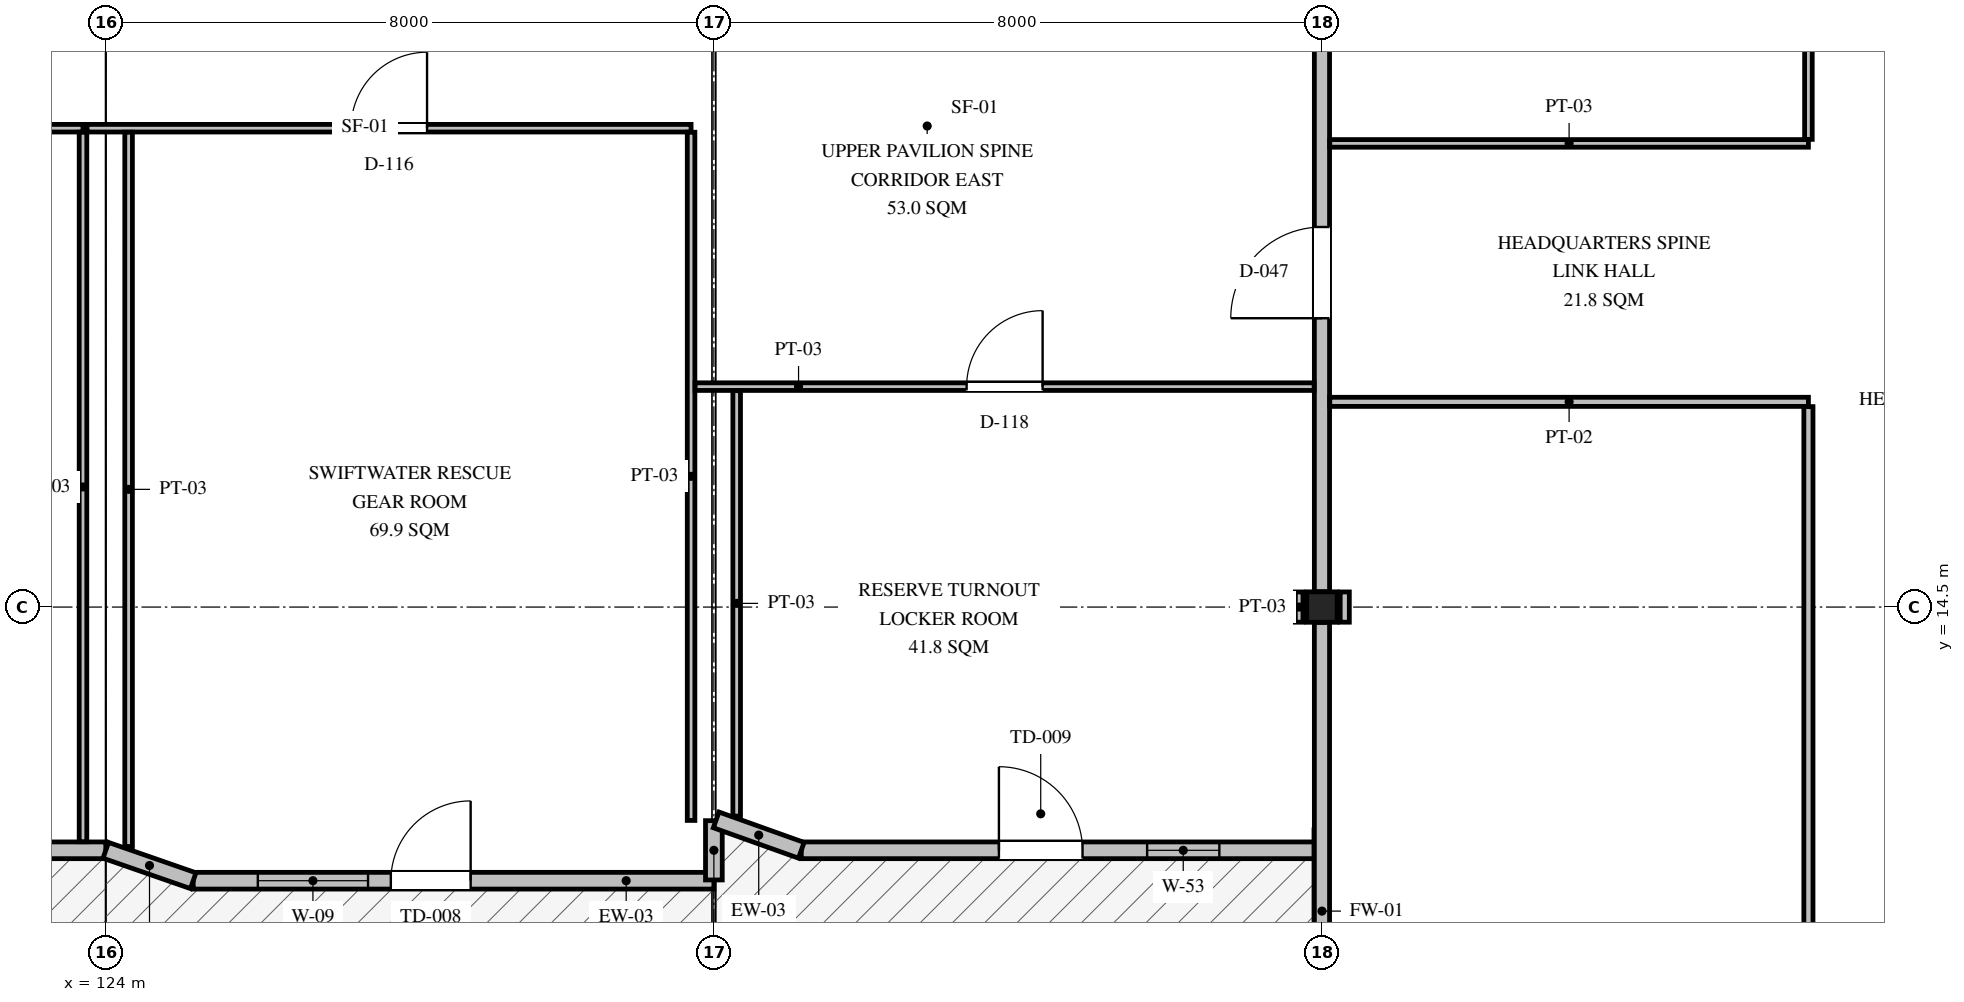
"""IFC4 building model, lengths in metres.
Left out: names, types, materials, properties, quantities, classifications, styles, units other than length and angle.
Written with IfcOpenShell. Run it as: python <this file> out.ifc"""

import sys

from ifc_helpers import new_model, si_unit, direction, frame, frame_2d, origin, origin_2d, place, context, subcontext, project, spatial, polyline, rectangle, i_section, outline, extrude, element, fill, save


model = new_model("IFC4")
c1 = context("Model", 3, precision=1e-05, world=origin(), true_north=direction((0.0, 1.0)))
c2 = subcontext(c1, "Body", "Model", "MODEL_VIEW")
j1 = project(units=[si_unit("LENGTHUNIT", "METRE"), si_unit("PLANEANGLEUNIT", "RADIAN")], contexts=[c1])
p1 = place(None, origin())
s1 = spatial("IfcSite", under=j1, at=p1, CompositionType="ELEMENT")
p2 = place(p1, origin())
s2 = spatial("IfcBuilding", under=s1, at=p2, CompositionType="ELEMENT")
p3 = place(p2, frame((0.0, 0.0, 5.85)))
s3 = spatial("IfcBuildingStorey", under=s2, at=p3, CompositionType="ELEMENT", Elevation=5.85)
p4 = place(p3, frame((140.0, 14.5, 0.0), z_axis=(0.0, 0.0, 1.0), x_axis=(1.0, 0.0, 0.0)))
e1 = element("IfcColumn", 1, at=p4, inside=s3, PredefinedType="COLUMN", context=c2, shape_type="SweptSolid", body=[
    extrude(i_section(OverallWidth=0.4, OverallDepth=0.4, WebThickness=0.013, FlangeThickness=0.021, FilletRadius=0.022, at=origin_2d()), origin(), (0.0, 0.0, 1.0), 4.2),
])
p5 = place(p3, frame((116.65, 11.3, 0.0), z_axis=(0.0, 0.0, 1.0), x_axis=(1.0, 0.0, 0.0)))
e2 = element("IfcWall", 2, at=p5, inside=s3, PredefinedType="SOLIDWALL", context=c2, shape_type="SweptSolid", body=[
    extrude(rectangle(XDim=7.35, YDim=0.22, at=frame_2d((3.675, 0.0))), origin(), (0.0, 0.0, 1.0), 4.0),
])
p6 = place(p5, frame((2.6, 0.0, 0.0)))
e3 = element("IfcOpeningElement", 3, at=p6, cuts=e2, PredefinedType="OPENING", context=c2, shape_type="SweptSolid", body=[
    extrude(rectangle(XDim=1.1, YDim=2.2, at=frame_2d((0.55, 1.1))), frame((0.0, 0.12, 0.0), z_axis=(0.0, -1.0, 0.0), x_axis=(1.0, 0.0, 0.0)), (0.0, 0.0, 1.0), 0.24),
])
p7 = place(p5, frame((0.8, 0.0, 1.1)))
e4 = element("IfcOpeningElement", 4, at=p7, cuts=e2, PredefinedType="OPENING", context=c2, shape_type="SweptSolid", body=[
    extrude(rectangle(XDim=1.35, YDim=1.35, at=frame_2d((0.675, 0.675))), frame((0.0, 0.12, 0.0), z_axis=(0.0, -1.0, 0.0), x_axis=(1.0, 0.0, 0.0)), (0.0, 0.0, 1.0), 0.24),
])
p8 = place(p5, frame((4.55, 0.0, 1.35)))
e5 = element("IfcOpeningElement", 5, at=p8, cuts=e2, PredefinedType="OPENING", context=c2, shape_type="SweptSolid", body=[
    extrude(rectangle(XDim=1.7, YDim=1.65, at=frame_2d((0.85, 0.825))), frame((0.0, 0.12, 0.0), z_axis=(0.0, -1.0, 0.0), x_axis=(1.0, 0.0, 0.0)), (0.0, 0.0, 1.0), 0.24),
])
p9 = place(p3, frame((125.15, 10.9, 0.0), z_axis=(0.0, 0.0, 1.0), x_axis=(1.0, 0.0, 0.0)))
e6 = element("IfcWall", 6, at=p9, inside=s3, PredefinedType="SOLIDWALL", context=c2, shape_type="SweptSolid", body=[
    extrude(outline(polyline([(0.0, 0.0), (6.85, 0.0), (6.85, 3.95), (2.21, 10.82), (0.0, 3.95), (0.0, 0.0)])), frame((0.0, 0.11, 0.0), z_axis=(0.0, -1.0, 0.0), x_axis=(1.0, 0.0, 0.0)), (0.0, 0.0, 1.0), 0.22),
])
p10 = place(p9, frame((2.6, 0.0, 0.0)))
e7 = element("IfcOpeningElement", 7, at=p10, cuts=e6, PredefinedType="OPENING", context=c2, shape_type="SweptSolid", body=[
    extrude(rectangle(XDim=1.05, YDim=2.15, at=frame_2d((0.525, 1.075))), frame((0.0, 0.12, 0.0), z_axis=(0.0, -1.0, 0.0), x_axis=(1.0, 0.0, 0.0)), (0.0, 0.0, 1.0), 0.24),
])
p11 = place(p9, frame((0.85, 0.0, 1.1)))
e8 = element("IfcOpeningElement", 8, at=p11, cuts=e6, PredefinedType="OPENING", context=c2, shape_type="SweptSolid", body=[
    extrude(rectangle(XDim=1.45, YDim=1.45, at=frame_2d((0.725, 0.725))), frame((0.0, 0.12, 0.0), z_axis=(0.0, -1.0, 0.0), x_axis=(1.0, 0.0, 0.0)), (0.0, 0.0, 1.0), 0.24),
])
p12 = place(p3, frame((124.0, 11.3, 0.0), z_axis=(0.0, 0.0, 1.0), x_axis=(0.944450799651, -0.328652836651, 0.0)))
e9 = element("IfcWall", 9, at=p12, inside=s3, PredefinedType="SOLIDWALL", context=c2, shape_type="SweptSolid", body=[
    extrude(outline(polyline([(0.0, 0.0), (1.218, 0.0), (1.218, 3.95), (0.0, 3.95), (0.0, 0.0)])), frame((0.0, 0.11, 0.0), z_axis=(0.0, -1.0, 0.0), x_axis=(1.0, 0.0, 0.0)), (0.0, 0.0, 1.0), 0.22),
])
p13 = place(p3, frame((132.0, 10.91, 0.0), z_axis=(0.0, 0.0, 1.0), x_axis=(0.0, 1.0, 0.0)))
e10 = element("IfcWall", 10, at=p13, inside=s3, PredefinedType="SOLIDWALL", context=c2, shape_type="SweptSolid", body=[
    extrude(rectangle(XDim=0.78, YDim=0.22, at=frame_2d((0.39, 0.0))), origin(), (0.0, 0.0, 1.0), 3.59),
])
p14 = place(p3, frame((133.15, 11.3, 0.0), z_axis=(0.0, 0.0, 1.0), x_axis=(1.0, 0.0, 0.0)))
e11 = element("IfcWall", 11, at=p14, inside=s3, PredefinedType="SOLIDWALL", context=c2, shape_type="SweptSolid", body=[
    extrude(rectangle(XDim=6.75, YDim=0.22, at=frame_2d((3.375, 0.0))), origin(), (0.0, 0.0, 1.0), 3.96),
])
p15 = place(p14, frame((2.6, 0.0, 0.0)))
e12 = element("IfcOpeningElement", 12, at=p15, cuts=e11, PredefinedType="OPENING", context=c2, shape_type="SweptSolid", body=[
    extrude(rectangle(XDim=1.1, YDim=2.2, at=frame_2d((0.55, 1.1))), frame((0.0, 0.12, 0.0), z_axis=(0.0, -1.0, 0.0), x_axis=(1.0, 0.0, 0.0)), (0.0, 0.0, 1.0), 0.24),
])
p16 = place(p14, frame((4.55, 0.0, 1.35)))
e13 = element("IfcOpeningElement", 13, at=p16, cuts=e11, PredefinedType="OPENING", context=c2, shape_type="SweptSolid", body=[
    extrude(rectangle(XDim=0.95, YDim=1.65, at=frame_2d((0.475, 0.825))), frame((0.0, 0.12, 0.0), z_axis=(0.0, -1.0, 0.0), x_axis=(1.0, 0.0, 0.0)), (0.0, 0.0, 1.0), 0.24),
])
p17 = place(p3, frame((132.03, 11.7, 0.0), z_axis=(0.0, 0.0, 1.0), x_axis=(0.941755845838, -0.336297378566, 0.0)))
e14 = element("IfcWall", 14, at=p17, inside=s3, PredefinedType="SOLIDWALL", context=c2, shape_type="SweptSolid", body=[
    extrude(outline(polyline([(0.0, 0.0), (1.189, 0.0), (1.189, 3.95), (0.0, 3.95), (0.0, 0.0)])), frame((0.0, 0.11, 0.0), z_axis=(0.0, -1.0, 0.0), x_axis=(1.0, 0.0, 0.0)), (0.0, 0.0, 1.0), 0.22),
])
p18 = place(p3, frame((140.0, 6.702, 0.0), z_axis=(0.0, 0.0, 1.0), x_axis=(0.0, 1.0, 0.0)))
e15 = element("IfcWall", 15, at=p18, inside=s3, PredefinedType="PARTITIONING", context=c2, shape_type="SweptSolid", body=[
    extrude(rectangle(XDim=7.596, YDim=0.2, at=frame_2d((3.798, 0.0))), origin(), (0.0, 0.0, 1.0), 3.366),
])
p19 = place(p3, frame((140.0, 14.702, 0.0), z_axis=(0.0, 0.0, 1.0), x_axis=(0.0, 1.0, 0.0)))
e16 = element("IfcWall", 16, at=p19, inside=s3, PredefinedType="PARTITIONING", context=c2, shape_type="SweptSolid", body=[
    extrude(rectangle(XDim=7.596, YDim=0.2, at=frame_2d((3.798, 0.0))), origin(), (0.0, 0.0, 1.0), 3.304),
])
p20 = place(p19, frame((3.598, 0.0, 0.0)))
e17 = element("IfcOpeningElement", 17, at=p20, cuts=e16, PredefinedType="OPENING", context=c2, shape_type="SweptSolid", body=[
    extrude(rectangle(XDim=1.2, YDim=2.15, at=frame_2d((0.6, 1.075))), frame((0.0, 0.11, 0.0), z_axis=(0.0, -1.0, 0.0), x_axis=(1.0, 0.0, 0.0)), (0.0, 0.0, 1.0), 0.22),
])
p21 = place(p3, frame((115.253, 20.8, 0.0), z_axis=(0.0, 0.0, 1.0), x_axis=(1.0, 0.0, 0.0)))
e18 = element("IfcWall", 18, at=p21, inside=s3, PredefinedType="PARTITIONING", context=c2, shape_type="SweptSolid", body=[
    extrude(rectangle(XDim=8.447, YDim=0.1, at=frame_2d((4.224, 0.0))), origin(), (0.0, 0.0, 1.0), 3.544),
])
p22 = place(p21, frame((3.723, 0.0, 0.0)))
e19 = element("IfcOpeningElement", 19, at=p22, cuts=e18, PredefinedType="OPENING", context=c2, shape_type="SweptSolid", body=[
    extrude(rectangle(XDim=1.0, YDim=2.1, at=frame_2d((0.5, 1.05))), frame((0.0, 0.06, 0.0), z_axis=(0.0, -1.0, 0.0), x_axis=(1.0, 0.0, 0.0)), (0.0, 0.0, 1.0), 0.12),
])
p23 = place(p3, frame((123.7, 11.413, 0.0), z_axis=(0.0, 0.0, 1.0), x_axis=(0.0, 1.0, 0.0)))
e20 = element("IfcWall", 20, at=p23, inside=s3, PredefinedType="PARTITIONING", context=c2, shape_type="SweptSolid", body=[
    extrude(rectangle(XDim=9.334, YDim=0.1, at=frame_2d((4.667, 0.0))), origin(), (0.0, 0.0, 1.0), 3.594),
])
p24 = place(p3, frame((123.753, 20.8, 0.0), z_axis=(0.0, 0.0, 1.0), x_axis=(1.0, 0.0, 0.0)))
e21 = element("IfcWall", 21, at=p24, inside=s3, PredefinedType="PARTITIONING", context=c2, shape_type="SweptSolid", body=[
    extrude(rectangle(XDim=7.947, YDim=0.1, at=frame_2d((3.974, 0.0))), origin(), (0.0, 0.0, 1.0), 3.544),
])
p25 = place(p24, frame((3.473, 0.0, 0.0)))
e22 = element("IfcOpeningElement", 22, at=p25, cuts=e21, PredefinedType="OPENING", context=c2, shape_type="SweptSolid", body=[
    extrude(rectangle(XDim=1.0, YDim=2.1, at=frame_2d((0.5, 1.05))), frame((0.0, 0.06, 0.0), z_axis=(0.0, -1.0, 0.0), x_axis=(1.0, 0.0, 0.0)), (0.0, 0.0, 1.0), 0.12),
])
p26 = place(p3, frame((124.3, 11.35, 0.0), z_axis=(0.0, 0.0, 1.0), x_axis=(0.0, 1.0, 0.0)))
e23 = element("IfcWall", 23, at=p26, inside=s3, PredefinedType="PARTITIONING", context=c2, shape_type="SweptSolid", body=[
    extrude(rectangle(XDim=9.397, YDim=0.1, at=frame_2d((4.698, 0.0))), origin(), (0.0, 0.0, 1.0), 3.594),
])
p27 = place(p3, frame((131.7, 11.693, 0.0), z_axis=(0.0, 0.0, 1.0), x_axis=(0.0, 1.0, 0.0)))
e24 = element("IfcWall", 24, at=p27, inside=s3, PredefinedType="PARTITIONING", context=c2, shape_type="SweptSolid", body=[
    extrude(rectangle(XDim=9.054, YDim=0.1, at=frame_2d((4.527, 0.0))), origin(), (0.0, 0.0, 1.0), 3.594),
])
p28 = place(p3, frame((131.753, 17.4, 0.0), z_axis=(0.0, 0.0, 1.0), x_axis=(1.0, 0.0, 0.0)))
e25 = element("IfcWall", 25, at=p28, inside=s3, PredefinedType="PARTITIONING", context=c2, shape_type="SweptSolid", body=[
    extrude(rectangle(XDim=8.144, YDim=0.1, at=frame_2d((4.072, 0.0))), origin(), (0.0, 0.0, 1.0), 3.96),
])
p29 = place(p28, frame((3.572, 0.0, 0.0)))
e26 = element("IfcOpeningElement", 26, at=p29, cuts=e25, PredefinedType="OPENING", context=c2, shape_type="SweptSolid", body=[
    extrude(rectangle(XDim=1.0, YDim=2.1, at=frame_2d((0.5, 1.05))), frame((0.0, 0.06, 0.0), z_axis=(0.0, -1.0, 0.0), x_axis=(1.0, 0.0, 0.0)), (0.0, 0.0, 1.0), 0.12),
])
p30 = place(p3, frame((132.3, 11.75, 0.0), z_axis=(0.0, 0.0, 1.0), x_axis=(0.0, 1.0, 0.0)))
e27 = element("IfcWall", 27, at=p30, inside=s3, PredefinedType="PARTITIONING", context=c2, shape_type="SweptSolid", body=[
    extrude(rectangle(XDim=5.597, YDim=0.1, at=frame_2d((2.798, 0.0))), origin(), (0.0, 0.0, 1.0), 3.594),
])
p31 = place(p3, frame((139.7, 14.301, 0.0), z_axis=(0.0, 0.0, 1.0), x_axis=(0.0, 1.0, 0.0)))
e28 = element("IfcWall", 28, at=p31, inside=s3, PredefinedType="PARTITIONING", context=c2, shape_type="SweptSolid", body=[
    extrude(rectangle(XDim=0.398, YDim=0.1, at=frame_2d((0.199, 0.0))), origin(), (0.0, 0.0, 1.0), 3.96),
])
p32 = place(p3, frame((140.103, 17.2, 0.0), z_axis=(0.0, 0.0, 1.0), x_axis=(1.0, 0.0, 0.0)))
e29 = element("IfcWall", 29, at=p32, inside=s3, PredefinedType="PARTITIONING", context=c2, shape_type="SweptSolid", body=[
    extrude(rectangle(XDim=6.297, YDim=0.12, at=frame_2d((3.148, 0.0))), origin(), (0.0, 0.0, 1.0), 3.96),
])
p33 = place(p3, frame((140.3, 14.301, 0.0), z_axis=(0.0, 0.0, 1.0), x_axis=(0.0, 1.0, 0.0)))
e30 = element("IfcWall", 30, at=p33, inside=s3, PredefinedType="PARTITIONING", context=c2, shape_type="SweptSolid", body=[
    extrude(rectangle(XDim=0.398, YDim=0.12, at=frame_2d((0.199, 0.0))), origin(), (0.0, 0.0, 1.0), 3.96),
])
p34 = place(p3, frame((146.4, 0.083, 0.0), z_axis=(0.0, 0.0, 1.0), x_axis=(0.0, 1.0, 0.0)))
e31 = element("IfcWall", 31, at=p34, inside=s3, PredefinedType="PARTITIONING", context=c2, shape_type="SweptSolid", body=[
    extrude(rectangle(XDim=17.054, YDim=0.12, at=frame_2d((8.527, 0.0))), origin(), (0.0, 0.0, 1.0), 3.654),
])
p35 = place(p34, frame((8.037, 0.0, 0.0)))
e32 = element("IfcOpeningElement", 32, at=p35, cuts=e31, PredefinedType="OPENING", context=c2, shape_type="SweptSolid", body=[
    extrude(rectangle(XDim=0.98, YDim=2.1, at=frame_2d((0.49, 1.05))), frame((0.0, 0.07, 0.0), z_axis=(0.0, -1.0, 0.0), x_axis=(1.0, 0.0, 0.0)), (0.0, 0.0, 1.0), 0.14),
])
p36 = place(p3, frame((140.103, 20.6, 0.0), z_axis=(0.0, 0.0, 1.0), x_axis=(1.0, 0.0, 0.0)))
e33 = element("IfcWall", 33, at=p36, inside=s3, PredefinedType="PARTITIONING", context=c2, shape_type="SweptSolid", body=[
    extrude(rectangle(XDim=6.297, YDim=0.1, at=frame_2d((3.148, 0.0))), origin(), (0.0, 0.0, 1.0), 3.96),
])
p37 = place(p3, frame((146.4, 20.653, 0.0), z_axis=(0.0, 0.0, 1.0), x_axis=(0.0, 1.0, 0.0)))
e34 = element("IfcWall", 34, at=p37, inside=s3, PredefinedType="PARTITIONING", context=c2, shape_type="SweptSolid", body=[
    extrude(rectangle(XDim=9.494, YDim=0.1, at=frame_2d((4.747, 0.0))), origin(), (0.0, 0.0, 1.0), 3.71),
])
p38 = place(p37, frame((4.247, 0.0, 0.0)))
e35 = element("IfcOpeningElement", 35, at=p38, cuts=e34, PredefinedType="OPENING", context=c2, shape_type="SweptSolid", body=[
    extrude(rectangle(XDim=1.0, YDim=2.1, at=frame_2d((0.5, 1.05))), frame((0.0, 0.06, 0.0), z_axis=(0.0, -1.0, 0.0), x_axis=(1.0, 0.0, 0.0)), (0.0, 0.0, 1.0), 0.12),
])
p39 = place(p10, frame((1.05, 0.0, 0.0), z_axis=(0.0, 0.0, 1.0), x_axis=(-1.0, 0.0, 0.0)))
e36 = element("IfcDoor", 36, at=p39, inside=s3, OperationType="SINGLE_SWING_RIGHT", PredefinedType="DOOR", context=c2, shape_type="SweptSolid", body=[
    extrude(rectangle(XDim=1.05, YDim=2.15, at=frame_2d((0.525, 1.075))), frame((0.0, 0.025, 0.0), z_axis=(0.0, -1.0, 0.0), x_axis=(1.0, 0.0, 0.0)), (0.0, 0.0, 1.0), 0.05),
])
fill(e7, e36)
p40 = place(p11, origin())
e37 = element("IfcWindow", 37, at=p40, inside=s3, PartitioningType="SINGLE_PANEL", PredefinedType="WINDOW", context=c2, shape_type="SweptSolid", body=[
    extrude(rectangle(XDim=1.45, YDim=1.45, at=frame_2d((0.725, 0.725))), frame((0.0, 0.03, 0.0), z_axis=(0.0, -1.0, 0.0), x_axis=(1.0, 0.0, 0.0)), (0.0, 0.0, 1.0), 0.06),
])
fill(e8, e37)
p41 = place(p15, frame((1.1, 0.0, 0.0), z_axis=(0.0, 0.0, 1.0), x_axis=(-1.0, 0.0, 0.0)))
e38 = element("IfcDoor", 38, at=p41, inside=s3, OperationType="SINGLE_SWING_LEFT", PredefinedType="DOOR", context=c2, shape_type="SweptSolid", body=[
    extrude(rectangle(XDim=1.1, YDim=2.2, at=frame_2d((0.55, 1.1))), frame((0.0, 0.025, 0.0), z_axis=(0.0, -1.0, 0.0), x_axis=(1.0, 0.0, 0.0)), (0.0, 0.0, 1.0), 0.05),
])
fill(e12, e38)
p42 = place(p16, origin())
e39 = element("IfcWindow", 39, at=p42, inside=s3, PartitioningType="SINGLE_PANEL", PredefinedType="WINDOW", context=c2, shape_type="SweptSolid", body=[
    extrude(rectangle(XDim=0.95, YDim=1.65, at=frame_2d((0.475, 0.825))), frame((0.0, 0.03, 0.0), z_axis=(0.0, -1.0, 0.0), x_axis=(1.0, 0.0, 0.0)), (0.0, 0.0, 1.0), 0.06),
])
fill(e13, e39)
p43 = place(p20, origin())
e40 = element("IfcDoor", 40, at=p43, inside=s3, OperationType="SINGLE_SWING_LEFT", PredefinedType="DOOR", context=c2, shape_type="SweptSolid", body=[
    extrude(rectangle(XDim=1.2, YDim=2.15, at=frame_2d((0.6, 1.075))), frame((0.0, 0.025, 0.0), z_axis=(0.0, -1.0, 0.0), x_axis=(1.0, 0.0, 0.0)), (0.0, 0.0, 1.0), 0.05),
])
fill(e17, e40)
p44 = place(p25, origin())
e41 = element("IfcDoor", 41, at=p44, inside=s3, OperationType="SINGLE_SWING_RIGHT", PredefinedType="DOOR", context=c2, shape_type="SweptSolid", body=[
    extrude(rectangle(XDim=1.0, YDim=2.1, at=frame_2d((0.5, 1.05))), frame((0.0, 0.025, 0.0), z_axis=(0.0, -1.0, 0.0), x_axis=(1.0, 0.0, 0.0)), (0.0, 0.0, 1.0), 0.05),
])
fill(e22, e41)
p45 = place(p29, origin())
e42 = element("IfcDoor", 42, at=p45, inside=s3, OperationType="SINGLE_SWING_RIGHT", PredefinedType="DOOR", context=c2, shape_type="SweptSolid", body=[
    extrude(rectangle(XDim=1.0, YDim=2.1, at=frame_2d((0.5, 1.05))), frame((0.0, 0.025, 0.0), z_axis=(0.0, -1.0, 0.0), x_axis=(1.0, 0.0, 0.0)), (0.0, 0.0, 1.0), 0.05),
])
fill(e26, e42)
save(model, sys.argv[1])
